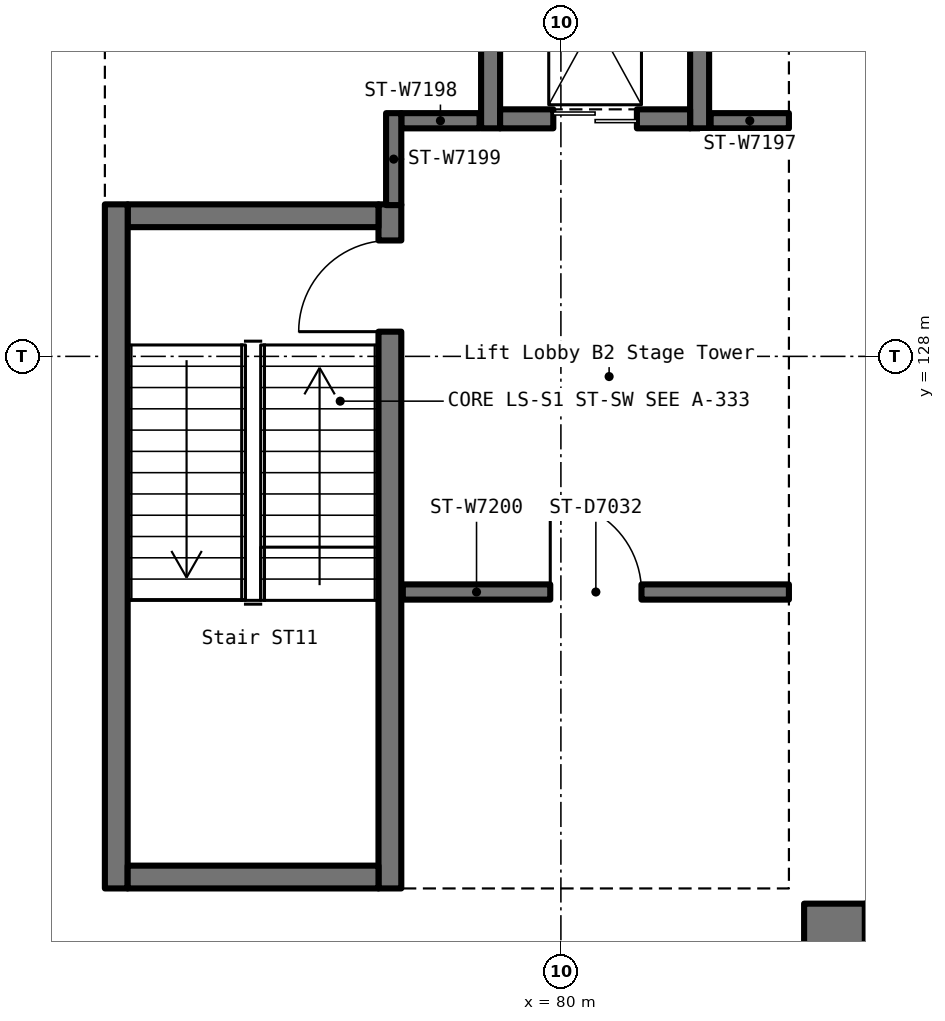
"""IFC4 building model, lengths in metres.
Left out: names, types, materials, properties, quantities, classifications, styles, units other than length and angle.
Written with IfcOpenShell. Run it as: python <this file> out.ifc"""

import sys

from ifc_helpers import new_model, si_unit, direction, frame, frame_2d, origin, place, context, subcontext, project, spatial, rectangle, extrude, element, fill, save


model = new_model("IFC4")
c1 = context("Model", 3, precision=1e-05, world=origin(), true_north=direction((0.0, 1.0)))
c2 = subcontext(c1, "Body", "Model", "MODEL_VIEW")
j1 = project(units=[si_unit("LENGTHUNIT", "METRE"), si_unit("PLANEANGLEUNIT", "RADIAN")], contexts=[c1])
p1 = place(None, origin())
s1 = spatial("IfcSite", under=j1, at=p1, CompositionType="ELEMENT")
p2 = place(p1, origin())
s2 = spatial("IfcBuilding", under=s1, at=p2, CompositionType="ELEMENT")
p3 = place(p2, frame((0.0, 0.0, -10.5)))
s3 = spatial("IfcBuildingStorey", under=s2, at=p3, CompositionType="ELEMENT", Elevation=-10.5)
p4 = place(p3, frame((83.6, 95.2, -0.3), z_axis=(0.0, 0.0, 1.0), x_axis=(0.0, 1.0, 0.0)))
e1 = element("IfcWall", 1, at=p4, inside=s3, PredefinedType="SHEAR", context=c2, shape_type="SweptSolid", body=[
    extrude(rectangle(XDim=25.6, YDim=0.8, at=frame_2d((12.8, 0.0))), origin(), (0.0, 0.0, 1.0), 4.8),
])
p5 = place(p3, frame((77.75, 121.0, 0.0), z_axis=(0.0, 0.0, 1.0), x_axis=(0.0, 1.0, 0.0)))
e2 = element("IfcWall", 2, at=p5, inside=s3, PredefinedType="SOLIDWALL", context=c2, shape_type="SweptSolid", body=[
    extrude(rectangle(XDim=9.0, YDim=0.3, at=frame_2d((4.5, 0.0))), origin(), (0.0, 0.0, 1.0), 4.5),
])
p6 = place(p5, frame((7.325, 0.0, 0.0)))
e3 = element("IfcOpeningElement", 3, at=p6, cuts=e2, PredefinedType="OPENING", context=c2, shape_type="SweptSolid", body=[
    extrude(rectangle(XDim=1.2, YDim=2.1, at=frame_2d((0.6, 1.05))), frame((0.0, 0.162, 0.0), z_axis=(0.0, -1.0, 0.0), x_axis=(1.0, 0.0, 0.0)), (0.0, 0.0, 1.0), 0.324),
])
p7 = place(p3, frame((77.6, 129.85, 0.0), z_axis=(0.0, 0.0, 1.0), x_axis=(-1.0, 0.0, 0.0)))
e4 = element("IfcWall", 4, at=p7, inside=s3, PredefinedType="SOLIDWALL", context=c2, shape_type="SweptSolid", body=[
    extrude(rectangle(XDim=3.3, YDim=0.3, at=frame_2d((1.65, 0.0))), origin(), (0.0, 0.0, 1.0), 4.5),
])
p8 = place(p3, frame((74.15, 130.0, 0.0), z_axis=(0.0, 0.0, 1.0), x_axis=(0.0, -1.0, 0.0)))
e5 = element("IfcWall", 5, at=p8, inside=s3, PredefinedType="SOLIDWALL", context=c2, shape_type="SweptSolid", body=[
    extrude(rectangle(XDim=9.0, YDim=0.3, at=frame_2d((4.5, 0.0))), origin(), (0.0, 0.0, 1.0), 4.5),
])
p9 = place(p3, frame((74.3, 121.15, 0.0), z_axis=(0.0, 0.0, 1.0), x_axis=(1.0, 0.0, 0.0)))
e6 = element("IfcWall", 6, at=p9, inside=s3, PredefinedType="SOLIDWALL", context=c2, shape_type="SweptSolid", body=[
    extrude(rectangle(XDim=3.3, YDim=0.3, at=frame_2d((1.65, 0.0))), origin(), (0.0, 0.0, 1.0), 4.5),
])
for number, where, z_axis, x_axis in (
    (7, (81.825, 131.0, 0.0), (0.0, 0.0, 1.0), (0.0, 1.0, 0.0)),
    (8, (79.075, 135.0, 0.0), (0.0, 0.0, 1.0), (0.0, -1.0, 0.0)),
):
    element("IfcWall", number, at=place(p3, frame(where, z_axis=z_axis, x_axis=x_axis)), inside=s3, PredefinedType="SOLIDWALL", context=c2, shape_type="SweptSolid", body=[
        extrude(rectangle(XDim=4.0, YDim=0.25, at=frame_2d((2.0, 0.0))), origin(), (0.0, 0.0, 1.0), 4.5),
    ])
p10 = place(p3, frame((79.2, 131.125, 0.0), z_axis=(0.0, 0.0, 1.0), x_axis=(1.0, 0.0, 0.0)))
e9 = element("IfcWall", 9, at=p10, inside=s3, PredefinedType="SOLIDWALL", context=c2, shape_type="SweptSolid", body=[
    extrude(rectangle(XDim=2.5, YDim=0.25, at=frame_2d((1.25, 0.0))), origin(), (0.0, 0.0, 1.0), 4.5),
])
p11 = place(p10, frame((0.7, 0.0, 0.0)))
e10 = element("IfcOpeningElement", 10, at=p11, cuts=e9, PredefinedType="OPENING", context=c2, shape_type="SweptSolid", body=[
    extrude(rectangle(XDim=1.1, YDim=2.1, at=frame_2d((0.55, 1.05))), frame((0.0, 0.137, 0.0), z_axis=(0.0, -1.0, 0.0), x_axis=(1.0, 0.0, 0.0)), (0.0, 0.0, 1.0), 0.274),
])
for number, where, z_axis, x_axis in (
    (11, (83.0, 131.1, 0.0), (0.0, 0.0, 1.0), (-1.0, 0.0, 0.0)),
    (12, (78.93, 131.1, 0.0), (0.0, 0.0, 1.0), (-1.0, 0.0, 0.0)),
):
    element("IfcWall", number, at=place(p3, frame(where, z_axis=z_axis, x_axis=x_axis)), inside=s3, PredefinedType="PARTITIONING", context=c2, shape_type="SweptSolid", body=[
        extrude(rectangle(XDim=1.03, YDim=0.2, at=frame_2d((0.515, 0.0))), origin(), (0.0, 0.0, 1.0), 4.2),
    ])
p12 = place(p3, frame((77.8, 131.2, 0.0), z_axis=(0.0, 0.0, 1.0), x_axis=(0.0, -1.0, 0.0)))
e13 = element("IfcWall", 13, at=p12, inside=s3, PredefinedType="PARTITIONING", context=c2, shape_type="SweptSolid", body=[
    extrude(rectangle(XDim=1.21, YDim=0.2, at=frame_2d((0.605, 0.0))), origin(), (0.0, 0.0, 1.0), 4.2),
])
p13 = place(p3, frame((77.92, 124.9, 0.0), z_axis=(0.0, 0.0, 1.0), x_axis=(1.0, 0.0, 0.0)))
e14 = element("IfcWall", 14, at=p13, inside=s3, PredefinedType="PARTITIONING", context=c2, shape_type="SweptSolid", body=[
    extrude(rectangle(XDim=5.08, YDim=0.2, at=frame_2d((2.54, 0.0))), origin(), (0.0, 0.0, 1.0), 4.2),
])
p14 = place(p13, frame((1.94, 0.0, 0.0)))
e15 = element("IfcOpeningElement", 15, at=p14, cuts=e14, PredefinedType="OPENING", context=c2, shape_type="SweptSolid", body=[
    extrude(rectangle(XDim=1.2, YDim=2.1, at=frame_2d((0.6, 1.05))), frame((0.0, 0.112, 0.0), z_axis=(0.0, -1.0, 0.0), x_axis=(1.0, 0.0, 0.0)), (0.0, 0.0, 1.0), 0.224),
])
p15 = place(p6, origin())
e16 = element("IfcDoor", 16, at=p15, inside=s3, OperationType="SINGLE_SWING_LEFT", PredefinedType="DOOR", context=c2, shape_type="SweptSolid", body=[
    extrude(rectangle(XDim=1.2, YDim=2.1, at=frame_2d((0.6, 1.05))), frame((0.0, 0.025, 0.0), z_axis=(0.0, -1.0, 0.0), x_axis=(1.0, 0.0, 0.0)), (0.0, 0.0, 1.0), 0.05),
])
fill(e3, e16)
p16 = place(p11, origin())
e17 = element("IfcDoor", 17, at=p16, inside=s3, OperationType="DOUBLE_DOOR_SLIDING", PredefinedType="DOOR", context=c2, shape_type="SweptSolid", body=[
    extrude(rectangle(XDim=1.1, YDim=2.1, at=frame_2d((0.55, 1.05))), frame((0.0, 0.025, 0.0), z_axis=(0.0, -1.0, 0.0), x_axis=(1.0, 0.0, 0.0)), (0.0, 0.0, 1.0), 0.05),
])
fill(e10, e17)
p17 = place(p14, origin())
e18 = element("IfcDoor", 18, at=p17, inside=s3, OperationType="SINGLE_SWING_LEFT", PredefinedType="DOOR", context=c2, shape_type="SweptSolid", body=[
    extrude(rectangle(XDim=1.2, YDim=2.1, at=frame_2d((0.6, 1.05))), frame((0.0, 0.025, 0.0), z_axis=(0.0, -1.0, 0.0), x_axis=(1.0, 0.0, 0.0)), (0.0, 0.0, 1.0), 0.05),
])
fill(e15, e18)
save(model, sys.argv[1])
